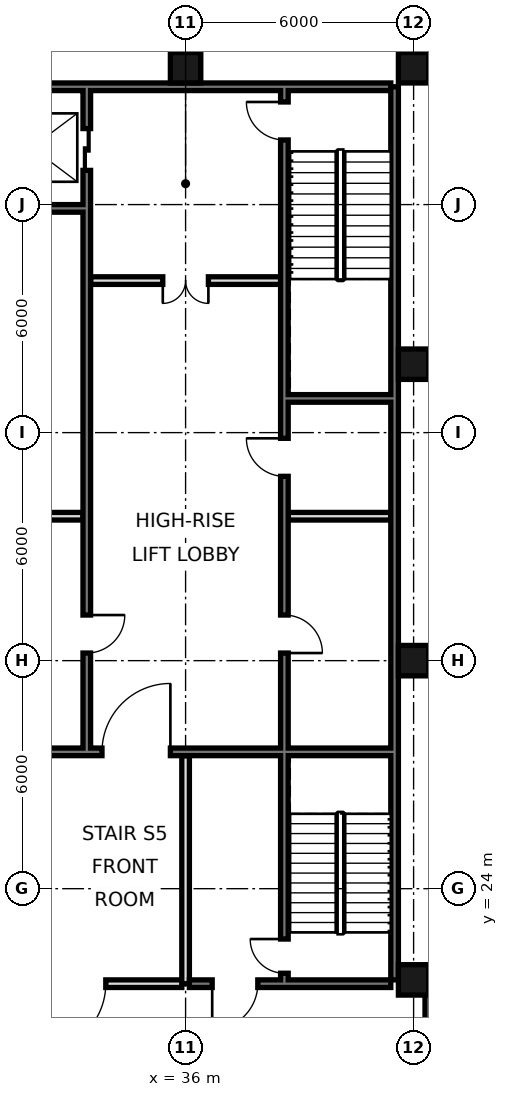
"""IFC4 building model, lengths in metres.
Left out: names, types, materials, properties, quantities, classifications, styles, units other than length and angle.
Written with IfcOpenShell. Run it as: python <this file> out.ifc"""

import sys

from ifc_helpers import new_model, si_unit, direction, frame, frame_2d, origin, origin_2d, place, context, subcontext, project, spatial, rectangle, hollow_rectangle, extrude, element, fill, save


model = new_model("IFC4")
c1 = context("Model", 3, precision=1e-05, world=origin(), true_north=direction((0.0, 1.0)))
c2 = subcontext(c1, "Body", "Model", "MODEL_VIEW")
j1 = project(units=[si_unit("LENGTHUNIT", "METRE"), si_unit("PLANEANGLEUNIT", "RADIAN")], contexts=[c1])
p1 = place(None, origin())
s1 = spatial("IfcSite", under=j1, at=p1, CompositionType="ELEMENT")
p2 = place(p1, origin())
s2 = spatial("IfcBuilding", under=s1, at=p2, CompositionType="ELEMENT")
p3 = place(p2, frame((0.0, 0.0, -13.5)))
s3 = spatial("IfcBuildingStorey", under=s2, at=p3, CompositionType="ELEMENT", Elevation=-13.5)
for number, where, z_axis, x_axis in (
    (1, (36.0, 45.6, 0.0), (0.0, 0.0, 1.0), (1.0, 0.0, 0.0)),
    (2, (42.0, 21.6, 0.0), (0.0, 0.0, 1.0), (1.0, 0.0, 0.0)),
    (3, (42.0, 30.0, 0.0), (0.0, 0.0, 1.0), (1.0, 0.0, 0.0)),
    (4, (42.0, 37.8, 0.0), (0.0, 0.0, 1.0), (1.0, 0.0, 0.0)),
    (5, (42.0, 45.6, 0.0), (0.0, 0.0, 1.0), (1.0, 0.0, 0.0)),
):
    element("IfcColumn", number, at=place(p3, frame(where, z_axis=z_axis, x_axis=x_axis)), inside=s3, PredefinedType="COLUMN", context=c2, shape_type="SweptSolid", body=[
        extrude(hollow_rectangle(XDim=0.8, YDim=0.8, WallThickness=0.07, at=origin_2d()), origin(), (0.0, 0.0, 1.0), 4.5),
    ])
p4 = place(p3, frame((42.4, 17.7, 0.0), z_axis=(0.0, 0.0, 1.0), x_axis=(0.0, 1.0, 0.0)))
e6 = element("IfcWall", 6, at=p4, inside=s3, PredefinedType="SOLIDWALL", context=c2, shape_type="SweptSolid", body=[
    extrude(rectangle(XDim=3.9, YDim=0.2, at=frame_2d((1.95, 0.0))), origin(), (0.0, 0.0, 1.0), 4.15),
])
p5 = place(p3, frame((41.5, 21.6, 0.0), z_axis=(0.0, 0.0, 1.0), x_axis=(0.0, 1.0, 0.0)))
e7 = element("IfcWall", 7, at=p5, inside=s3, PredefinedType="SOLIDWALL", context=c2, shape_type="SweptSolid", body=[
    extrude(rectangle(XDim=23.5, YDim=0.2, at=frame_2d((11.75, 0.0))), origin(), (0.0, 0.0, 1.0), 4.15),
])
p6 = place(p3, frame((6.6, 45.1, 0.0), z_axis=(0.0, 0.0, 1.0), x_axis=(1.0, 0.0, 0.0)))
e8 = element("IfcWall", 8, at=p6, inside=s3, PredefinedType="SOLIDWALL", context=c2, shape_type="SweptSolid", body=[
    extrude(rectangle(XDim=34.8, YDim=0.2, at=frame_2d((17.4, 0.0))), origin(), (0.0, 0.0, 1.0), 4.15),
])
p7 = place(p3, frame((12.1, 21.5, 0.0), z_axis=(0.0, 0.0, 1.0), x_axis=(1.0, 0.0, 0.0)))
e9 = element("IfcWall", 9, at=p7, inside=s3, PredefinedType="SOLIDWALL", context=c2, shape_type="SweptSolid", body=[
    extrude(rectangle(XDim=23.8, YDim=0.2, at=frame_2d((11.9, 0.0))), origin(), (0.0, 0.0, 1.0), 3.05),
])
p8 = place(p7, frame((2.0, 0.0, 0.0)))
e10 = element("IfcOpeningElement", 10, at=p8, cuts=e9, PredefinedType="OPENING", context=c2, shape_type="SweptSolid", body=[
    extrude(rectangle(XDim=1.8, YDim=2.1, at=frame_2d((0.9, 1.05))), frame((0.0, 0.11, 0.0), z_axis=(0.0, -1.0, 0.0), x_axis=(1.0, 0.0, 0.0)), (0.0, 0.0, 1.0), 0.22),
])
p9 = place(p7, frame((11.0, 0.0, 0.0)))
e11 = element("IfcOpeningElement", 11, at=p9, cuts=e9, PredefinedType="OPENING", context=c2, shape_type="SweptSolid", body=[
    extrude(rectangle(XDim=1.8, YDim=2.1, at=frame_2d((0.9, 1.05))), frame((0.0, 0.11, 0.0), z_axis=(0.0, -1.0, 0.0), x_axis=(1.0, 0.0, 0.0)), (0.0, 0.0, 1.0), 0.22),
])
p10 = place(p7, frame((20.0, 0.0, 0.0)))
e12 = element("IfcOpeningElement", 12, at=p10, cuts=e9, PredefinedType="OPENING", context=c2, shape_type="SweptSolid", body=[
    extrude(rectangle(XDim=1.8, YDim=2.1, at=frame_2d((0.9, 1.05))), frame((0.0, 0.11, 0.0), z_axis=(0.0, -1.0, 0.0), x_axis=(1.0, 0.0, 0.0)), (0.0, 0.0, 1.0), 0.22),
])
p11 = place(p3, frame((33.4, 27.7, 0.0), z_axis=(0.0, 0.0, 1.0), x_axis=(0.0, 1.0, 0.0)))
e13 = element("IfcWall", 13, at=p11, inside=s3, PredefinedType="SOLIDWALL", context=c2, shape_type="SweptSolid", body=[
    extrude(rectangle(XDim=17.3, YDim=0.2, at=frame_2d((8.65, 0.0))), origin(), (0.0, 0.0, 1.0), 3.05),
])
p12 = place(p11, frame((15.2, 0.0, 0.0)))
e14 = element("IfcOpeningElement", 14, at=p12, cuts=e13, PredefinedType="OPENING", context=c2, shape_type="SweptSolid", body=[
    extrude(rectangle(XDim=1.1, YDim=2.1, at=frame_2d((0.55, 1.05))), frame((0.0, 0.11, 0.0), z_axis=(0.0, -1.0, 0.0), x_axis=(1.0, 0.0, 0.0)), (0.0, 0.0, 1.0), 0.22),
])
p13 = place(p11, frame((2.5, 0.0, 0.0)))
e15 = element("IfcOpeningElement", 15, at=p13, cuts=e13, PredefinedType="OPENING", context=c2, shape_type="SweptSolid", body=[
    extrude(rectangle(XDim=1.0, YDim=2.1, at=frame_2d((0.5, 1.05))), frame((0.0, 0.11, 0.0), z_axis=(0.0, -1.0, 0.0), x_axis=(1.0, 0.0, 0.0)), (0.0, 0.0, 1.0), 0.22),
])
p14 = place(p3, frame((36.0, 21.5, 0.0), z_axis=(0.0, 0.0, 1.0), x_axis=(0.0, 1.0, 0.0)))
e16 = element("IfcWall", 16, at=p14, inside=s3, PredefinedType="PARTITIONING", context=c2, shape_type="SweptSolid", body=[
    extrude(rectangle(XDim=6.0, YDim=0.2, at=frame_2d((3.0, 0.0))), origin(), (0.0, 0.0, 1.0), 3.05),
])
p15 = place(p3, frame((38.6, 21.5, 0.0), z_axis=(0.0, 0.0, 1.0), x_axis=(0.0, 1.0, 0.0)))
e17 = element("IfcWall", 17, at=p15, inside=s3, PredefinedType="SOLIDWALL", context=c2, shape_type="SweptSolid", body=[
    extrude(rectangle(XDim=23.5, YDim=0.2, at=frame_2d((11.75, 0.0))), origin(), (0.0, 0.0, 1.0), 3.05),
])
p16 = place(p15, frame((8.7, 0.0, 0.0)))
e18 = element("IfcOpeningElement", 18, at=p16, cuts=e17, PredefinedType="OPENING", context=c2, shape_type="SweptSolid", body=[
    extrude(rectangle(XDim=1.0, YDim=2.1, at=frame_2d((0.5, 1.05))), frame((0.0, 0.11, 0.0), z_axis=(0.0, -1.0, 0.0), x_axis=(1.0, 0.0, 0.0)), (0.0, 0.0, 1.0), 0.22),
])
p17 = place(p15, frame((13.35, 0.0, 0.0)))
e19 = element("IfcOpeningElement", 19, at=p17, cuts=e17, PredefinedType="OPENING", context=c2, shape_type="SweptSolid", body=[
    extrude(rectangle(XDim=1.0, YDim=2.1, at=frame_2d((0.5, 1.05))), frame((0.0, 0.11, 0.0), z_axis=(0.0, -1.0, 0.0), x_axis=(1.0, 0.0, 0.0)), (0.0, 0.0, 1.0), 0.22),
])
p18 = place(p15, frame((22.2, 0.0, 0.0)))
e20 = element("IfcOpeningElement", 20, at=p18, cuts=e17, PredefinedType="OPENING", context=c2, shape_type="SweptSolid", body=[
    extrude(rectangle(XDim=1.0, YDim=2.1, at=frame_2d((0.5, 1.05))), frame((0.0, 0.11, 0.0), z_axis=(0.0, -1.0, 0.0), x_axis=(1.0, 0.0, 0.0)), (0.0, 0.0, 1.0), 0.22),
])
p19 = place(p15, frame((0.275, 0.0, 0.0)))
e21 = element("IfcOpeningElement", 21, at=p19, cuts=e17, PredefinedType="OPENING", context=c2, shape_type="SweptSolid", body=[
    extrude(rectangle(XDim=0.9, YDim=2.1, at=frame_2d((0.45, 1.05))), frame((0.0, 0.11, 0.0), z_axis=(0.0, -1.0, 0.0), x_axis=(1.0, 0.0, 0.0)), (0.0, 0.0, 1.0), 0.22),
])
p20 = place(p3, frame((36.1, 21.5, 0.0), z_axis=(0.0, 0.0, 1.0), x_axis=(1.0, 0.0, 0.0)))
e22 = element("IfcWall", 22, at=p20, inside=s3, PredefinedType="SOLIDWALL", context=c2, shape_type="SweptSolid", body=[
    extrude(rectangle(XDim=5.3, YDim=0.2, at=frame_2d((2.65, 0.0))), origin(), (0.0, 0.0, 1.0), 3.05),
])
p21 = place(p20, frame((0.6, 0.0, 0.0)))
e23 = element("IfcOpeningElement", 23, at=p21, cuts=e22, PredefinedType="OPENING", context=c2, shape_type="SweptSolid", body=[
    extrude(rectangle(XDim=1.2, YDim=2.1, at=frame_2d((0.6, 1.05))), frame((0.0, 0.11, 0.0), z_axis=(0.0, -1.0, 0.0), x_axis=(1.0, 0.0, 0.0)), (0.0, 0.0, 1.0), 0.22),
])
p22 = place(p3, frame((30.6, 27.6, 0.0), z_axis=(0.0, 0.0, 1.0), x_axis=(1.0, 0.0, 0.0)))
e24 = element("IfcWall", 24, at=p22, inside=s3, PredefinedType="SOLIDWALL", context=c2, shape_type="SweptSolid", body=[
    extrude(rectangle(XDim=10.8, YDim=0.2, at=frame_2d((5.4, 0.0))), origin(), (0.0, 0.0, 1.0), 4.15),
])
p23 = place(p22, frame((3.2, 0.0, 0.0)))
e25 = element("IfcOpeningElement", 25, at=p23, cuts=e24, PredefinedType="OPENING", context=c2, shape_type="SweptSolid", body=[
    extrude(rectangle(XDim=1.8, YDim=2.1, at=frame_2d((0.9, 1.05))), frame((0.0, 0.11, 0.0), z_axis=(0.0, -1.0, 0.0), x_axis=(1.0, 0.0, 0.0)), (0.0, 0.0, 1.0), 0.22),
])
for number, where, z_axis, x_axis in (
    (26, (30.6, 33.8, 0.0), (0.0, 0.0, 1.0), (1.0, 0.0, 0.0)),
    (27, (38.7, 33.8, 0.0), (0.0, 0.0, 1.0), (1.0, 0.0, 0.0)),
):
    element("IfcWall", number, at=place(p3, frame(where, z_axis=z_axis, x_axis=x_axis)), inside=s3, PredefinedType="PARTITIONING", context=c2, shape_type="SweptSolid", body=[
        extrude(rectangle(XDim=2.7, YDim=0.2, at=frame_2d((1.35, 0.0))), origin(), (0.0, 0.0, 1.0), 4.15),
    ])
p24 = place(p3, frame((38.7, 36.9, 0.0), z_axis=(0.0, 0.0, 1.0), x_axis=(1.0, 0.0, 0.0)))
e28 = element("IfcWall", 28, at=p24, inside=s3, PredefinedType="SOLIDWALL", context=c2, shape_type="SweptSolid", body=[
    extrude(rectangle(XDim=2.7, YDim=0.2, at=frame_2d((1.35, 0.0))), origin(), (0.0, 0.0, 1.0), 4.15),
])
p25 = place(p3, frame((33.5, 40.0, 0.0), z_axis=(0.0, 0.0, 1.0), x_axis=(1.0, 0.0, 0.0)))
e29 = element("IfcWall", 29, at=p25, inside=s3, PredefinedType="PARTITIONING", context=c2, shape_type="SweptSolid", body=[
    extrude(rectangle(XDim=5.0, YDim=0.2, at=frame_2d((2.5, 0.0))), origin(), (0.0, 0.0, 1.0), 4.15),
])
p26 = place(p25, frame((1.9, 0.0, 0.0)))
e30 = element("IfcOpeningElement", 30, at=p26, cuts=e29, PredefinedType="OPENING", context=c2, shape_type="SweptSolid", body=[
    extrude(rectangle(XDim=1.2, YDim=2.1, at=frame_2d((0.6, 1.05))), frame((0.0, 0.11, 0.0), z_axis=(0.0, -1.0, 0.0), x_axis=(1.0, 0.0, 0.0)), (0.0, 0.0, 1.0), 0.22),
])
p27 = place(p3, frame((30.6, 41.9, 0.0), z_axis=(0.0, 0.0, 1.0), x_axis=(1.0, 0.0, 0.0)))
e31 = element("IfcWall", 31, at=p27, inside=s3, PredefinedType="SOLIDWALL", context=c2, shape_type="SweptSolid", body=[
    extrude(rectangle(XDim=2.7, YDim=0.2, at=frame_2d((1.35, 0.0))), origin(), (0.0, 0.0, 1.0), 4.15),
])
p28 = place(p10, frame((1.8, 0.0, 0.0), z_axis=(0.0, 0.0, 1.0), x_axis=(-1.0, 0.0, 0.0)))
e32 = element("IfcDoor", 32, at=p28, inside=s3, OperationType="SINGLE_SWING_RIGHT", PredefinedType="DOOR", context=c2, shape_type="SweptSolid", body=[
    extrude(rectangle(XDim=1.8, YDim=2.1, at=frame_2d((0.9, 1.05))), frame((0.0, 0.025, 0.0), z_axis=(0.0, -1.0, 0.0), x_axis=(1.0, 0.0, 0.0)), (0.0, 0.0, 1.0), 0.05),
])
fill(e12, e32)
p29 = place(p21, frame((1.2, 0.0, 0.0), z_axis=(0.0, 0.0, 1.0), x_axis=(-1.0, 0.0, 0.0)))
e33 = element("IfcDoor", 33, at=p29, inside=s3, OperationType="SINGLE_SWING_RIGHT", PredefinedType="DOOR", context=c2, shape_type="SweptSolid", body=[
    extrude(rectangle(XDim=1.2, YDim=2.1, at=frame_2d((0.6, 1.05))), frame((0.0, 0.025, 0.0), z_axis=(0.0, -1.0, 0.0), x_axis=(1.0, 0.0, 0.0)), (0.0, 0.0, 1.0), 0.05),
])
fill(e23, e33)
p30 = place(p23, frame((1.8, 0.0, 0.0), z_axis=(0.0, 0.0, 1.0), x_axis=(-1.0, 0.0, 0.0)))
e34 = element("IfcDoor", 34, at=p30, inside=s3, OperationType="SINGLE_SWING_LEFT", PredefinedType="DOOR", context=c2, shape_type="SweptSolid", body=[
    extrude(rectangle(XDim=1.8, YDim=2.1, at=frame_2d((0.9, 1.05))), frame((0.0, 0.025, 0.0), z_axis=(0.0, -1.0, 0.0), x_axis=(1.0, 0.0, 0.0)), (0.0, 0.0, 1.0), 0.05),
])
fill(e25, e34)
p31 = place(p26, frame((1.2, 0.0, 0.0), z_axis=(0.0, 0.0, 1.0), x_axis=(-1.0, 0.0, 0.0)))
e35 = element("IfcDoor", 35, at=p31, inside=s3, OperationType="DOUBLE_DOOR_SINGLE_SWING", PredefinedType="DOOR", context=c2, shape_type="SweptSolid", body=[
    extrude(rectangle(XDim=1.2, YDim=2.1, at=frame_2d((0.6, 1.05))), frame((0.0, 0.025, 0.0), z_axis=(0.0, -1.0, 0.0), x_axis=(1.0, 0.0, 0.0)), (0.0, 0.0, 1.0), 0.05),
])
fill(e30, e35)
p32 = place(p12, origin())
e36 = element("IfcDoor", 36, at=p32, inside=s3, OperationType="DOUBLE_DOOR_SLIDING", PredefinedType="DOOR", context=c2, shape_type="SweptSolid", body=[
    extrude(rectangle(XDim=1.1, YDim=2.1, at=frame_2d((0.55, 1.05))), frame((0.0, 0.025, 0.0), z_axis=(0.0, -1.0, 0.0), x_axis=(1.0, 0.0, 0.0)), (0.0, 0.0, 1.0), 0.05),
])
fill(e14, e36)
p33 = place(p16, frame((1.0, 0.0, 0.0), z_axis=(0.0, 0.0, 1.0), x_axis=(-1.0, 0.0, 0.0)))
e37 = element("IfcDoor", 37, at=p33, inside=s3, OperationType="SINGLE_SWING_RIGHT", PredefinedType="DOOR", context=c2, shape_type="SweptSolid", body=[
    extrude(rectangle(XDim=1.0, YDim=2.1, at=frame_2d((0.5, 1.05))), frame((0.0, 0.025, 0.0), z_axis=(0.0, -1.0, 0.0), x_axis=(1.0, 0.0, 0.0)), (0.0, 0.0, 1.0), 0.05),
])
fill(e18, e37)
p34 = place(p17, frame((1.0, 0.0, 0.0), z_axis=(0.0, 0.0, 1.0), x_axis=(-1.0, 0.0, 0.0)))
e38 = element("IfcDoor", 38, at=p34, inside=s3, OperationType="SINGLE_SWING_LEFT", PredefinedType="DOOR", context=c2, shape_type="SweptSolid", body=[
    extrude(rectangle(XDim=1.0, YDim=2.1, at=frame_2d((0.5, 1.05))), frame((0.0, 0.025, 0.0), z_axis=(0.0, -1.0, 0.0), x_axis=(1.0, 0.0, 0.0)), (0.0, 0.0, 1.0), 0.05),
])
fill(e19, e38)
p35 = place(p13, origin())
e39 = element("IfcDoor", 39, at=p35, inside=s3, OperationType="SINGLE_SWING_RIGHT", PredefinedType="DOOR", context=c2, shape_type="SweptSolid", body=[
    extrude(rectangle(XDim=1.0, YDim=2.1, at=frame_2d((0.5, 1.05))), frame((0.0, 0.025, 0.0), z_axis=(0.0, -1.0, 0.0), x_axis=(1.0, 0.0, 0.0)), (0.0, 0.0, 1.0), 0.05),
])
fill(e15, e39)
p36 = place(p18, frame((1.0, 0.0, 0.0), z_axis=(0.0, 0.0, 1.0), x_axis=(-1.0, 0.0, 0.0)))
e40 = element("IfcDoor", 40, at=p36, inside=s3, OperationType="SINGLE_SWING_LEFT", PredefinedType="DOOR", context=c2, shape_type="SweptSolid", body=[
    extrude(rectangle(XDim=1.0, YDim=2.1, at=frame_2d((0.5, 1.05))), frame((0.0, 0.025, 0.0), z_axis=(0.0, -1.0, 0.0), x_axis=(1.0, 0.0, 0.0)), (0.0, 0.0, 1.0), 0.05),
])
fill(e20, e40)
p37 = place(p19, frame((0.9, 0.0, 0.0), z_axis=(0.0, 0.0, 1.0), x_axis=(-1.0, 0.0, 0.0)))
e41 = element("IfcDoor", 41, at=p37, inside=s3, OperationType="SINGLE_SWING_LEFT", PredefinedType="DOOR", context=c2, shape_type="SweptSolid", body=[
    extrude(rectangle(XDim=0.9, YDim=2.1, at=frame_2d((0.45, 1.05))), frame((0.0, 0.025, 0.0), z_axis=(0.0, -1.0, 0.0), x_axis=(1.0, 0.0, 0.0)), (0.0, 0.0, 1.0), 0.05),
])
fill(e21, e41)
save(model, sys.argv[1])
